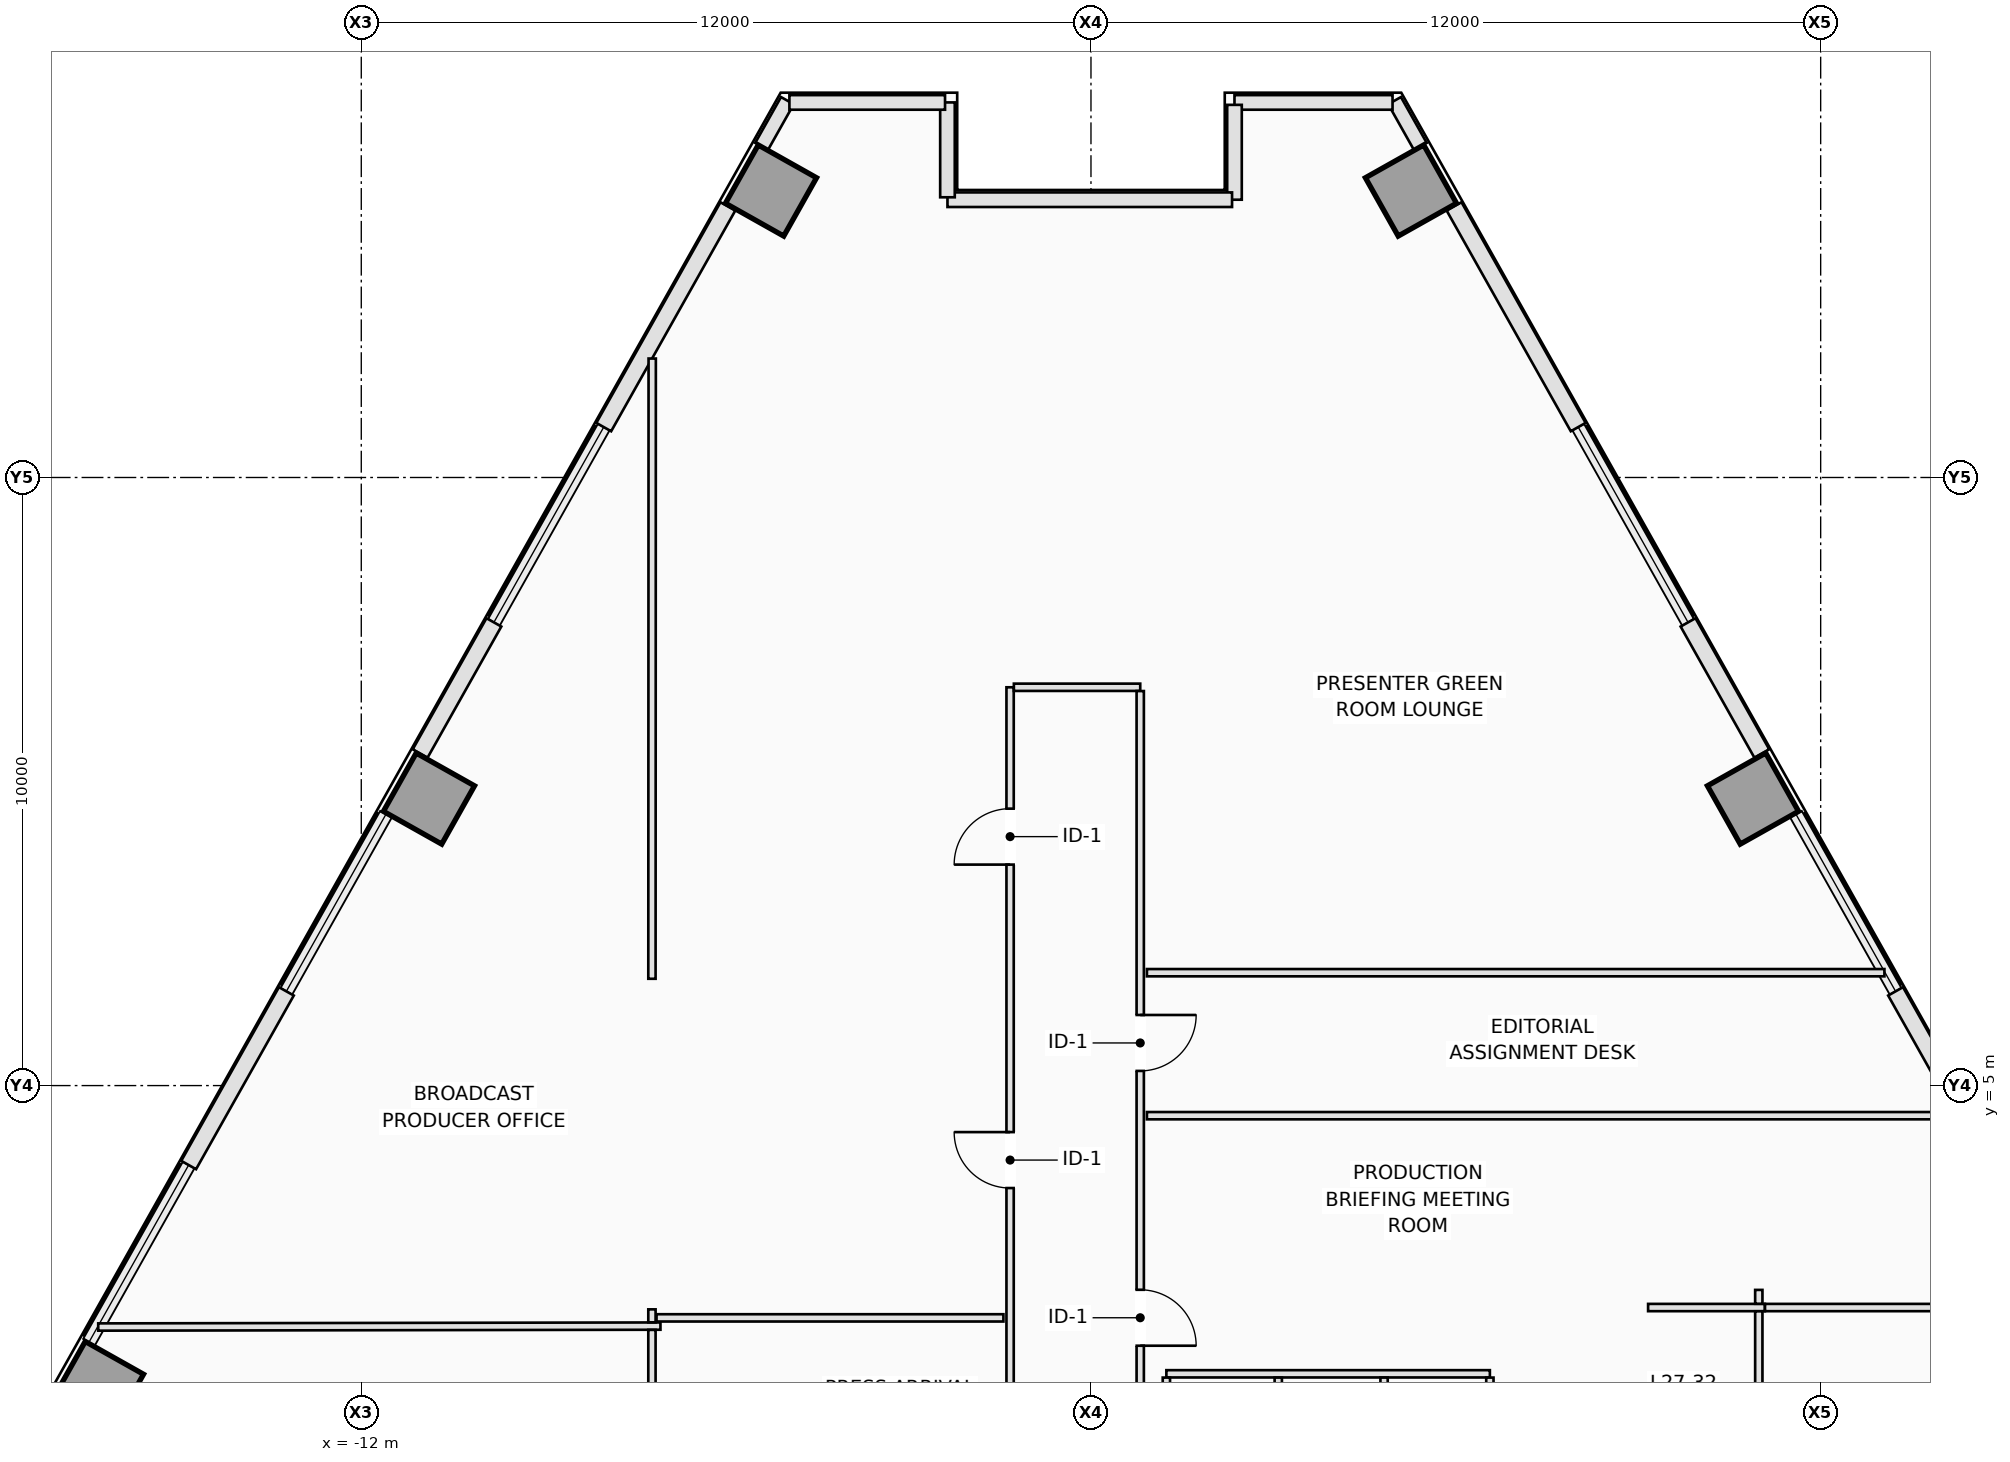
"""IFC4 building model, lengths in metres.
Left out: names, types, materials, properties, quantities, classifications, styles, units other than length and angle.
Written with IfcOpenShell. Run it as: python <this file> out.ifc"""

import sys

from ifc_helpers import new_model, si_unit, direction, frame, frame_2d, origin, origin_2d, place, context, subcontext, project, spatial, rectangle, extrude, element, fill, save


model = new_model("IFC4")
c1 = context("Model", 3, precision=1e-05, world=origin(), true_north=direction((0.0, 1.0)))
c2 = subcontext(c1, "Body", "Model", "MODEL_VIEW")
j1 = project(units=[si_unit("LENGTHUNIT", "METRE"), si_unit("PLANEANGLEUNIT", "RADIAN")], contexts=[c1])
p1 = place(None, origin())
s1 = spatial("IfcSite", under=j1, at=p1, CompositionType="ELEMENT")
p2 = place(p1, origin())
s2 = spatial("IfcBuilding", under=s1, at=p2, CompositionType="ELEMENT")
p3 = place(p2, frame((0.0, 0.0, 102.0)))
s3 = spatial("IfcBuildingStorey", under=s2, at=p3, CompositionType="ELEMENT", Elevation=102.0)
for number, where, z_axis, x_axis in (
    (1, (10.887, 9.72, 0.0), (0.0, 0.0, 1.0), (0.872, 0.49, 0.0)),
    (2, (5.262, 19.719, 0.0), (0.0, 0.0, 1.0), (0.872, 0.49, 0.0)),
    (3, (-5.262, 19.719, 0.0), (0.0, 0.0, 1.0), (-0.872, 0.49, 0.0)),
    (4, (-10.887, 9.72, 0.0), (0.0, 0.0, 1.0), (-0.872, 0.49, 0.0)),
    (5, (-16.33, 0.043, 0.0), (0.0, 0.0, 1.0), (-0.872, 0.49, 0.0)),
):
    element("IfcColumn", number, at=place(p3, frame(where, z_axis=z_axis, x_axis=x_axis)), inside=s3, PredefinedType="COLUMN", context=c2, shape_type="SweptSolid", body=[
        extrude(rectangle(XDim=1.1, YDim=1.1, at=origin_2d()), origin(), (0.0, 0.0, 1.0), 3.5),
    ])
p4 = place(p3, frame((4.993, 21.197, 0.0), z_axis=(0.0, 0.0, 1.0), x_axis=(0.490355003566, -0.871522788272, 0.0)))
e6 = element("IfcWall", 6, at=p4, inside=s3, PredefinedType="STANDARD", context=c2, shape_type="SweptSolid", body=[
    extrude(rectangle(XDim=0.865, YDim=0.24, at=frame_2d((0.433, 0.0))), origin(), (0.0, 0.0, 1.0), 3.25),
])
p5 = place(p3, frame((5.971, 19.458, 0.0), z_axis=(0.0, 0.0, 1.0), x_axis=(0.490280725514, -0.87156457603, 0.0)))
e7 = element("IfcWall", 7, at=p5, inside=s3, PredefinedType="STANDARD", context=c2, shape_type="SweptSolid", body=[
    extrude(rectangle(XDim=4.164, YDim=0.28, at=frame_2d((2.082, 0.0))), origin(), (0.0, 0.0, 1.0), 3.25),
])
p6 = place(p3, frame((9.819, 12.617, 0.0), z_axis=(0.0, 0.0, 1.0), x_axis=(0.490303410255, -0.871551814807, 0.0)))
e8 = element("IfcWall", 8, at=p6, inside=s3, PredefinedType="STANDARD", context=c2, shape_type="SweptSolid", body=[
    extrude(rectangle(XDim=2.474, YDim=0.28, at=frame_2d((1.237, 0.0))), origin(), (0.0, 0.0, 1.0), 3.25),
])
p7 = place(p3, frame((13.232, 6.55, 0.0), z_axis=(0.0, 0.0, 1.0), x_axis=(0.490310760781, -0.871547679626, 0.0)))
e9 = element("IfcWall", 9, at=p7, inside=s3, PredefinedType="STANDARD", context=c2, shape_type="SweptSolid", body=[
    extrude(rectangle(XDim=3.277, YDim=0.28, at=frame_2d((1.638, 0.0))), origin(), (0.0, 0.0, 1.0), 3.25),
])
p8 = place(p3, frame((-5.417, 20.443, 0.0), z_axis=(0.0, 0.0, 1.0), x_axis=(0.490355003566, 0.871522788272, 0.0)))
e10 = element("IfcWall", 10, at=p8, inside=s3, PredefinedType="STANDARD", context=c2, shape_type="SweptSolid", body=[
    extrude(rectangle(XDim=0.865, YDim=0.24, at=frame_2d((0.433, 0.0))), origin(), (0.0, 0.0, 1.0), 3.25),
])
p9 = place(p3, frame((-11.032, 10.461, 0.0), z_axis=(0.0, 0.0, 1.0), x_axis=(0.490303410255, 0.871551814807, 0.0)))
e11 = element("IfcWall", 11, at=p9, inside=s3, PredefinedType="STANDARD", context=c2, shape_type="SweptSolid", body=[
    extrude(rectangle(XDim=2.474, YDim=0.28, at=frame_2d((1.237, 0.0))), origin(), (0.0, 0.0, 1.0), 3.25),
])
p10 = place(p3, frame((-8.013, 15.829, 0.0), z_axis=(0.0, 0.0, 1.0), x_axis=(0.490280725514, 0.87156457603, 0.0)))
e12 = element("IfcWall", 12, at=p10, inside=s3, PredefinedType="STANDARD", context=c2, shape_type="SweptSolid", body=[
    extrude(rectangle(XDim=4.164, YDim=0.28, at=frame_2d((2.082, 0.0))), origin(), (0.0, 0.0, 1.0), 3.25),
])
p11 = place(p3, frame((-14.839, 3.694, 0.0), z_axis=(0.0, 0.0, 1.0), x_axis=(0.490310760781, 0.871547679626, 0.0)))
e13 = element("IfcWall", 13, at=p11, inside=s3, PredefinedType="STANDARD", context=c2, shape_type="SweptSolid", body=[
    extrude(rectangle(XDim=3.277, YDim=0.28, at=frame_2d((1.638, 0.0))), origin(), (0.0, 0.0, 1.0), 3.25),
])
p12 = place(p3, frame((4.959, 21.168, 0.0), z_axis=(0.0, 0.0, 1.0), x_axis=(-1.0, 0.0, 0.0)))
e14 = element("IfcWall", 14, at=p12, inside=s3, PredefinedType="STANDARD", context=c2, shape_type="SweptSolid", body=[
    extrude(rectangle(XDim=2.599, YDim=0.24, at=frame_2d((1.3, 0.0))), origin(), (0.0, 0.0, 1.0), 3.25),
])
p13 = place(p3, frame((2.36, 21.128, 0.0), z_axis=(0.0, 0.0, 1.0), x_axis=(0.0, -1.0, 0.0)))
e15 = element("IfcWall", 15, at=p13, inside=s3, PredefinedType="STANDARD", context=c2, shape_type="SweptSolid", body=[
    extrude(rectangle(XDim=1.56, YDim=0.24, at=frame_2d((0.78, 0.0))), origin(), (0.0, 0.0, 1.0), 3.25),
])
p14 = place(p3, frame((2.32, 19.568, 0.0), z_axis=(0.0, 0.0, 1.0), x_axis=(-1.0, 0.0, 0.0)))
e16 = element("IfcWall", 16, at=p14, inside=s3, PredefinedType="STANDARD", context=c2, shape_type="SweptSolid", body=[
    extrude(rectangle(XDim=4.68, YDim=0.24, at=frame_2d((2.34, 0.0))), origin(), (0.0, 0.0, 1.0), 2.722),
])
p15 = place(p3, frame((-2.36, 19.608, 0.0), z_axis=(0.0, 0.0, 1.0), x_axis=(0.0, 1.0, 0.0)))
e17 = element("IfcWall", 17, at=p15, inside=s3, PredefinedType="STANDARD", context=c2, shape_type="SweptSolid", body=[
    extrude(rectangle(XDim=1.56, YDim=0.24, at=frame_2d((0.78, 0.0))), origin(), (0.0, 0.0, 1.0), 3.25),
])
p16 = place(p3, frame((-2.4, 21.168, 0.0), z_axis=(0.0, 0.0, 1.0), x_axis=(-1.0, 0.0, 0.0)))
e18 = element("IfcWall", 18, at=p16, inside=s3, PredefinedType="STANDARD", context=c2, shape_type="SweptSolid", body=[
    extrude(rectangle(XDim=2.56, YDim=0.24, at=frame_2d((1.28, 0.0))), origin(), (0.0, 0.0, 1.0), 3.25),
])
p17 = place(p3, frame((1.24, 0.26, 0.0), z_axis=(0.0, 0.0, 1.0), x_axis=(1.0, 0.0, 0.0)))
e19 = element("IfcWall", 19, at=p17, inside=s3, PredefinedType="PARTITIONING", context=c2, shape_type="SweptSolid", body=[
    extrude(rectangle(XDim=5.32, YDim=0.12, at=frame_2d((2.66, 0.0))), origin(), (0.0, 0.0, 1.0), 2.891),
])
for number, where, z_axis, x_axis in (
    (20, (1.24, -2.378, 0.0), (0.0, 0.0, 1.0), (0.0, 1.0, 0.0)),
    (21, (3.08, -2.378, 0.0), (0.0, 0.0, 1.0), (0.0, 1.0, 0.0)),
    (22, (4.82, -2.378, 0.0), (0.0, 0.0, 1.0), (0.0, 1.0, 0.0)),
    (23, (6.56, -2.378, 0.0), (0.0, 0.0, 1.0), (0.0, 1.0, 0.0)),
):
    element("IfcWall", number, at=place(p3, frame(where, z_axis=z_axis, x_axis=x_axis)), inside=s3, PredefinedType="PARTITIONING", context=c2, shape_type="SweptSolid", body=[
        extrude(rectangle(XDim=2.576, YDim=0.12, at=frame_2d((1.288, 0.0))), origin(), (0.0, 0.0, 1.0), 3.25),
    ])
p18 = place(p3, frame((-1.33, -2.338, 0.0), z_axis=(0.0, 0.0, 1.0), x_axis=(0.0, 1.0, 0.0)))
e24 = element("IfcWall", 24, at=p18, inside=s3, PredefinedType="PARTITIONING", context=c2, shape_type="SweptSolid", body=[
    extrude(rectangle(XDim=13.888, YDim=0.12, at=frame_2d((6.944, 0.0))), origin(), (0.0, 0.0, 1.0), 3.25),
])
p19 = place(p18, frame((10.972, 0.0, 0.0)))
e25 = element("IfcOpeningElement", 25, at=p19, cuts=e24, PredefinedType="OPENING", context=c2, shape_type="SweptSolid", body=[
    extrude(rectangle(XDim=0.92, YDim=2.12, at=frame_2d((0.46, 1.06))), frame((0.0, 0.07, 0.0), z_axis=(0.0, -1.0, 0.0), x_axis=(1.0, 0.0, 0.0)), (0.0, 0.0, 1.0), 0.14),
])
p20 = place(p18, frame((5.653, 0.0, 0.0)))
e26 = element("IfcOpeningElement", 26, at=p20, cuts=e24, PredefinedType="OPENING", context=c2, shape_type="SweptSolid", body=[
    extrude(rectangle(XDim=0.92, YDim=2.12, at=frame_2d((0.46, 1.06))), frame((0.0, 0.07, 0.0), z_axis=(0.0, -1.0, 0.0), x_axis=(1.0, 0.0, 0.0)), (0.0, 0.0, 1.0), 0.14),
])
p21 = place(p3, frame((-1.268, 11.55, 0.0), z_axis=(0.0, 0.0, 1.0), x_axis=(1.0, 0.0, 0.0)))
e27 = element("IfcWall", 27, at=p21, inside=s3, PredefinedType="PARTITIONING", context=c2, shape_type="SweptSolid", body=[
    extrude(rectangle(XDim=2.078, YDim=0.12, at=frame_2d((1.039, 0.0))), origin(), (0.0, 0.0, 1.0), 3.25),
])
p22 = place(p3, frame((0.81, 11.488, 0.0), z_axis=(0.0, 0.0, 1.0), x_axis=(0.0, -1.0, 0.0)))
e28 = element("IfcWall", 28, at=p22, inside=s3, PredefinedType="PARTITIONING", context=c2, shape_type="SweptSolid", body=[
    extrude(rectangle(XDim=13.888, YDim=0.12, at=frame_2d((6.944, 0.0))), origin(), (0.0, 0.0, 1.0), 3.25),
])
p23 = place(p22, frame((5.327, 0.0, 0.0)))
e29 = element("IfcOpeningElement", 29, at=p23, cuts=e28, PredefinedType="OPENING", context=c2, shape_type="SweptSolid", body=[
    extrude(rectangle(XDim=0.92, YDim=2.12, at=frame_2d((0.46, 1.06))), frame((0.0, 0.07, 0.0), z_axis=(0.0, -1.0, 0.0), x_axis=(1.0, 0.0, 0.0)), (0.0, 0.0, 1.0), 0.14),
])
p24 = place(p22, frame((9.846, 0.0, 0.0)))
e30 = element("IfcOpeningElement", 30, at=p24, cuts=e28, PredefinedType="OPENING", context=c2, shape_type="SweptSolid", body=[
    extrude(rectangle(XDim=0.92, YDim=2.12, at=frame_2d((0.46, 1.06))), frame((0.0, 0.07, 0.0), z_axis=(0.0, -1.0, 0.0), x_axis=(1.0, 0.0, 0.0)), (0.0, 0.0, 1.0), 0.14),
])
p25 = place(p3, frame((-7.22, 6.756, 0.0), z_axis=(0.0, 0.0, 1.0), x_axis=(0.00043083842, 0.999999907189, 0.0)))
e31 = element("IfcWall", 31, at=p25, inside=s3, PredefinedType="PARTITIONING", context=c2, shape_type="SweptSolid", body=[
    extrude(rectangle(XDim=10.2, YDim=0.12, at=frame_2d((5.1, 0.0))), origin(), (0.0, 0.0, 1.0), 3.25),
])
p26 = place(p3, frame((13.048, 6.856, 0.0), z_axis=(0.0, 0.0, 1.0), x_axis=(-1.0, 0.0, 0.0)))
e32 = element("IfcWall", 32, at=p26, inside=s3, PredefinedType="PARTITIONING", context=c2, shape_type="SweptSolid", body=[
    extrude(rectangle(XDim=12.128, YDim=0.12, at=frame_2d((6.064, 0.0))), origin(), (0.0, 0.0, 1.0), 3.25),
])
p27 = place(p3, frame((-1.44, 1.18, 0.0), z_axis=(0.0, 0.0, 1.0), x_axis=(-1.0, 0.0, 0.0)))
e33 = element("IfcWall", 33, at=p27, inside=s3, PredefinedType="PARTITIONING", context=c2, shape_type="SweptSolid", body=[
    extrude(rectangle(XDim=5.705, YDim=0.12, at=frame_2d((2.852, 0.0))), origin(), (0.0, 0.0, 1.0), 3.25),
])
p28 = place(p3, frame((-7.08, 1.045, 0.0), z_axis=(0.0, 0.0, 1.0), x_axis=(-0.999998659895, -0.001637134401, 0.0)))
e34 = element("IfcWall", 34, at=p28, inside=s3, PredefinedType="PARTITIONING", context=c2, shape_type="SweptSolid", body=[
    extrude(rectangle(XDim=9.246, YDim=0.12, at=frame_2d((4.623, 0.0))), origin(), (0.0, 0.0, 1.0), 3.25),
])
p29 = place(p3, frame((14.219, 4.505, 0.0), z_axis=(0.0, 0.0, 1.0), x_axis=(-1.0, 0.0, 0.0)))
e35 = element("IfcWall", 35, at=p29, inside=s3, PredefinedType="PARTITIONING", context=c2, shape_type="SweptSolid", body=[
    extrude(rectangle(XDim=13.3, YDim=0.12, at=frame_2d((6.65, 0.0))), origin(), (0.0, 0.0, 1.0), 3.25),
])
p30 = place(p3, frame((11.083, 1.35, 0.0), z_axis=(0.0, 0.0, 1.0), x_axis=(-1.0, 0.0, 0.0)))
e36 = element("IfcWall", 36, at=p30, inside=s3, PredefinedType="PARTITIONING", context=c2, shape_type="SweptSolid", body=[
    extrude(rectangle(XDim=1.92, YDim=0.12, at=frame_2d((0.96, 0.0))), origin(), (0.0, 0.0, 1.0), 3.25),
])
p31 = place(p3, frame((16.146, 1.35, 0.0), z_axis=(0.0, 0.0, 1.0), x_axis=(-1.0, 0.0, 0.0)))
e37 = element("IfcWall", 37, at=p31, inside=s3, PredefinedType="PARTITIONING", context=c2, shape_type="SweptSolid", body=[
    extrude(rectangle(XDim=5.061, YDim=0.12, at=frame_2d((2.531, 0.0))), origin(), (0.0, 0.0, 1.0), 3.25),
])
p32 = place(p3, frame((10.982, 1.64, 0.0), z_axis=(0.0, 0.0, 1.0), x_axis=(0.0, -1.0, 0.0)))
e38 = element("IfcWall", 38, at=p32, inside=s3, PredefinedType="PARTITIONING", context=c2, shape_type="SweptSolid", body=[
    extrude(rectangle(XDim=0.228, YDim=0.12, at=frame_2d((0.114, 0.0))), origin(), (0.0, 0.0, 1.0), 3.25),
])
p33 = place(p3, frame((10.982, 1.288, 0.0), z_axis=(0.0, 0.0, 1.0), x_axis=(0.0, -1.0, 0.0)))
e39 = element("IfcWall", 39, at=p33, inside=s3, PredefinedType="PARTITIONING", context=c2, shape_type="SweptSolid", body=[
    extrude(rectangle(XDim=3.578, YDim=0.12, at=frame_2d((1.789, 0.0))), origin(), (0.0, 0.0, 1.0), 3.25),
])
p34 = place(p3, frame((-7.22, -2.29, 0.0), z_axis=(0.0, 0.0, 1.0), x_axis=(0.0, 1.0, 0.0)))
e40 = element("IfcWall", 40, at=p34, inside=s3, PredefinedType="PARTITIONING", context=c2, shape_type="SweptSolid", body=[
    extrude(rectangle(XDim=3.272, YDim=0.12, at=frame_2d((1.636, 0.0))), origin(), (0.0, 0.0, 1.0), 3.25),
])
p35 = place(p3, frame((-7.22, 1.106, 0.0), z_axis=(0.0, 0.0, 1.0), x_axis=(0.0, 1.0, 0.0)))
e41 = element("IfcWall", 41, at=p35, inside=s3, PredefinedType="PARTITIONING", context=c2, shape_type="SweptSolid", body=[
    extrude(rectangle(XDim=0.214, YDim=0.12, at=frame_2d((0.107, 0.0))), origin(), (0.0, 0.0, 1.0), 3.25),
])
p36 = place(p19, origin())
e42 = element("IfcDoor", 42, at=p36, inside=s3, OperationType="SINGLE_SWING_LEFT", PredefinedType="DOOR", context=c2, shape_type="SweptSolid", body=[
    extrude(rectangle(XDim=0.92, YDim=2.12, at=frame_2d((0.46, 1.06))), frame((0.0, 0.025, 0.0), z_axis=(0.0, -1.0, 0.0), x_axis=(1.0, 0.0, 0.0)), (0.0, 0.0, 1.0), 0.05),
])
fill(e25, e42)
p37 = place(p20, origin())
e43 = element("IfcDoor", 43, at=p37, inside=s3, OperationType="SINGLE_SWING_RIGHT", PredefinedType="DOOR", context=c2, shape_type="SweptSolid", body=[
    extrude(rectangle(XDim=0.92, YDim=2.12, at=frame_2d((0.46, 1.06))), frame((0.0, 0.025, 0.0), z_axis=(0.0, -1.0, 0.0), x_axis=(1.0, 0.0, 0.0)), (0.0, 0.0, 1.0), 0.05),
])
fill(e26, e43)
p38 = place(p23, origin())
e44 = element("IfcDoor", 44, at=p38, inside=s3, OperationType="SINGLE_SWING_LEFT", PredefinedType="DOOR", context=c2, shape_type="SweptSolid", body=[
    extrude(rectangle(XDim=0.92, YDim=2.12, at=frame_2d((0.46, 1.06))), frame((0.0, 0.025, 0.0), z_axis=(0.0, -1.0, 0.0), x_axis=(1.0, 0.0, 0.0)), (0.0, 0.0, 1.0), 0.05),
])
fill(e29, e44)
p39 = place(p24, origin())
e45 = element("IfcDoor", 45, at=p39, inside=s3, OperationType="SINGLE_SWING_RIGHT", PredefinedType="DOOR", context=c2, shape_type="SweptSolid", body=[
    extrude(rectangle(XDim=0.92, YDim=2.12, at=frame_2d((0.46, 1.06))), frame((0.0, 0.025, 0.0), z_axis=(0.0, -1.0, 0.0), x_axis=(1.0, 0.0, 0.0)), (0.0, 0.0, 1.0), 0.05),
])
fill(e30, e45)
save(model, sys.argv[1])
